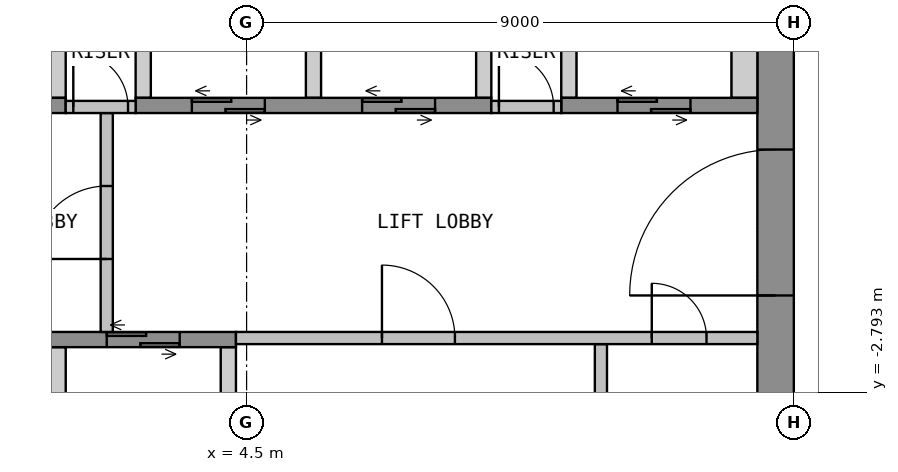
"""IFC4 building model, lengths in metres.
Left out: names, types, materials, properties, quantities, classifications, styles, units other than length and angle.
Written with IfcOpenShell. Run it as: python <this file> out.ifc"""

import sys

from ifc_helpers import new_model, si_unit, direction, frame, frame_2d, origin, place, context, subcontext, project, spatial, polyline, rectangle, outline, extrude, element, fill, save


model = new_model("IFC4")
c1 = context("Model", 3, precision=1e-05, world=origin(), true_north=direction((0.0, 1.0)))
c2 = subcontext(c1, "Body", "Model", "MODEL_VIEW")
j1 = project(units=[si_unit("LENGTHUNIT", "METRE"), si_unit("PLANEANGLEUNIT", "RADIAN")], contexts=[c1])
p1 = place(None, origin())
s1 = spatial("IfcSite", under=j1, at=p1, CompositionType="ELEMENT")
p2 = place(p1, origin())
s2 = spatial("IfcBuilding", under=s1, at=p2, CompositionType="ELEMENT")
p3 = place(p2, frame((0.0, 0.0, 246.9)))
s3 = spatial("IfcBuildingStorey", under=s2, at=p3, CompositionType="ELEMENT", Elevation=246.9)
p4 = place(p3, frame((13.2, -10.65, 0.0), z_axis=(0.0, 0.0, 1.0), x_axis=(0.0, 1.0, 0.0)))
e1 = element("IfcWall", 1, at=p4, inside=s3, PredefinedType="SHEAR", context=c2, shape_type="SweptSolid", body=[
    extrude(rectangle(XDim=21.3, YDim=0.6, at=frame_2d((10.65, 0.0))), origin(), (0.0, 0.0, 1.0), 3.575),
])
p5 = place(p4, frame((9.45, 0.0, 0.0)))
e2 = element("IfcOpeningElement", 2, at=p5, cuts=e1, PredefinedType="OPENING", context=c2, shape_type="SweptSolid", body=[
    extrude(rectangle(XDim=2.4, YDim=2.1, at=frame_2d((1.2, 1.05))), frame((0.0, 0.31, 0.0), z_axis=(0.0, -1.0, 0.0), x_axis=(1.0, 0.0, 0.0)), (0.0, 0.0, 1.0), 0.62),
])
p6 = place(p3, origin())
e3 = element("IfcWall", 3, at=p6, inside=s3, PredefinedType="SHEAR", context=c2, shape_type="SweptSolid", body=[
    extrude(outline(polyline([(1.275, 2.05), (1.525, 2.05), (1.525, 4.75), (1.275, 4.75), (1.275, 2.05)])), origin(), (0.0, 0.0, 1.0), 3.575),
])
p7 = place(p3, origin())
e4 = element("IfcWall", 4, at=p7, inside=s3, PredefinedType="SHEAR", context=c2, shape_type="SweptSolid", body=[
    extrude(outline(polyline([(2.675, 2.05), (2.925, 2.05), (2.925, 4.75), (2.675, 4.75), (2.675, 2.05)])), origin(), (0.0, 0.0, 1.0), 3.575),
])
p8 = place(p3, origin())
e5 = element("IfcWall", 5, at=p8, inside=s3, PredefinedType="SHEAR", context=c2, shape_type="SweptSolid", body=[
    extrude(outline(polyline([(5.475, 2.05), (5.725, 2.05), (5.725, 4.75), (5.475, 4.75), (5.475, 2.05)])), origin(), (0.0, 0.0, 1.0), 3.575),
])
p9 = place(p3, origin())
e6 = element("IfcWall", 6, at=p9, inside=s3, PredefinedType="SHEAR", context=c2, shape_type="SweptSolid", body=[
    extrude(outline(polyline([(8.275, 2.05), (8.525, 2.05), (8.525, 4.75), (8.275, 4.75), (8.275, 2.05)])), origin(), (0.0, 0.0, 1.0), 3.575),
])
p10 = place(p3, origin())
e7 = element("IfcWall", 7, at=p10, inside=s3, PredefinedType="SHEAR", context=c2, shape_type="SweptSolid", body=[
    extrude(outline(polyline([(9.675, 2.05), (9.925, 2.05), (9.925, 4.75), (9.675, 4.75), (9.675, 2.05)])), origin(), (0.0, 0.0, 1.0), 3.575),
])
p11 = place(p3, origin())
e8 = element("IfcWall", 8, at=p11, inside=s3, PredefinedType="SHEAR", context=c2, shape_type="SweptSolid", body=[
    extrude(outline(polyline([(12.475, 2.05), (12.9, 2.05), (12.9, 4.75), (12.475, 4.75), (12.475, 2.05)])), origin(), (0.0, 0.0, 1.0), 3.575),
])
p12 = place(p3, frame((-1.525, 1.925, 0.0), z_axis=(0.0, 0.0, 1.0), x_axis=(1.0, 0.0, 0.0)))
e9 = element("IfcWall", 9, at=p12, inside=s3, PredefinedType="SHEAR", context=c2, shape_type="SweptSolid", body=[
    extrude(rectangle(XDim=3.05, YDim=0.25, at=frame_2d((1.525, 0.0))), origin(), (0.0, 0.0, 1.0), 3.575),
])
p13 = place(p12, frame((0.925, 0.0, 0.0)))
e10 = element("IfcOpeningElement", 10, at=p13, cuts=e9, PredefinedType="OPENING", context=c2, shape_type="SweptSolid", body=[
    extrude(rectangle(XDim=1.2, YDim=2.1, at=frame_2d((0.6, 1.05))), frame((0.0, 0.135, 0.0), z_axis=(0.0, -1.0, 0.0), x_axis=(1.0, 0.0, 0.0)), (0.0, 0.0, 1.0), 0.27),
])
p14 = place(p3, frame((2.675, 1.925, 0.0), z_axis=(0.0, 0.0, 1.0), x_axis=(1.0, 0.0, 0.0)))
e11 = element("IfcWall", 11, at=p14, inside=s3, PredefinedType="SHEAR", context=c2, shape_type="SweptSolid", body=[
    extrude(rectangle(XDim=5.85, YDim=0.25, at=frame_2d((2.925, 0.0))), origin(), (0.0, 0.0, 1.0), 3.575),
])
p15 = place(p14, frame((0.925, 0.0, 0.0)))
e12 = element("IfcOpeningElement", 12, at=p15, cuts=e11, PredefinedType="OPENING", context=c2, shape_type="SweptSolid", body=[
    extrude(rectangle(XDim=1.2, YDim=2.1, at=frame_2d((0.6, 1.05))), frame((0.0, 0.135, 0.0), z_axis=(0.0, -1.0, 0.0), x_axis=(1.0, 0.0, 0.0)), (0.0, 0.0, 1.0), 0.27),
])
p16 = place(p14, frame((3.725, 0.0, 0.0)))
e13 = element("IfcOpeningElement", 13, at=p16, cuts=e11, PredefinedType="OPENING", context=c2, shape_type="SweptSolid", body=[
    extrude(rectangle(XDim=1.2, YDim=2.1, at=frame_2d((0.6, 1.05))), frame((0.0, 0.135, 0.0), z_axis=(0.0, -1.0, 0.0), x_axis=(1.0, 0.0, 0.0)), (0.0, 0.0, 1.0), 0.27),
])
p17 = place(p3, frame((9.675, 1.925, 0.0), z_axis=(0.0, 0.0, 1.0), x_axis=(1.0, 0.0, 0.0)))
e14 = element("IfcWall", 14, at=p17, inside=s3, PredefinedType="SHEAR", context=c2, shape_type="SweptSolid", body=[
    extrude(rectangle(XDim=3.225, YDim=0.25, at=frame_2d((1.612, 0.0))), origin(), (0.0, 0.0, 1.0), 3.575),
])
p18 = place(p17, frame((0.925, 0.0, 0.0)))
e15 = element("IfcOpeningElement", 15, at=p18, cuts=e14, PredefinedType="OPENING", context=c2, shape_type="SweptSolid", body=[
    extrude(rectangle(XDim=1.2, YDim=2.1, at=frame_2d((0.6, 1.05))), frame((0.0, 0.135, 0.0), z_axis=(0.0, -1.0, 0.0), x_axis=(1.0, 0.0, 0.0)), (0.0, 0.0, 1.0), 0.27),
])
p19 = place(p3, origin())
e16 = element("IfcWall", 16, at=p19, inside=s3, PredefinedType="SHEAR", context=c2, shape_type="SweptSolid", body=[
    extrude(outline(polyline([(1.275, -4.75), (1.525, -4.75), (1.525, -2.05), (1.275, -2.05), (1.275, -4.75)])), origin(), (0.0, 0.0, 1.0), 3.575),
])
p20 = place(p3, origin())
e17 = element("IfcWall", 17, at=p20, inside=s3, PredefinedType="SHEAR", context=c2, shape_type="SweptSolid", body=[
    extrude(outline(polyline([(4.075, -4.75), (4.325, -4.75), (4.325, -2.05), (4.075, -2.05), (4.075, -4.75)])), origin(), (0.0, 0.0, 1.0), 3.575),
])
p21 = place(p3, frame((-1.525, -1.925, 0.0), z_axis=(0.0, 0.0, 1.0), x_axis=(1.0, 0.0, 0.0)))
e18 = element("IfcWall", 18, at=p21, inside=s3, PredefinedType="SHEAR", context=c2, shape_type="SweptSolid", body=[
    extrude(rectangle(XDim=5.85, YDim=0.25, at=frame_2d((2.925, 0.0))), origin(), (0.0, 0.0, 1.0), 3.575),
])
p22 = place(p21, frame((0.925, 0.0, 0.0)))
e19 = element("IfcOpeningElement", 19, at=p22, cuts=e18, PredefinedType="OPENING", context=c2, shape_type="SweptSolid", body=[
    extrude(rectangle(XDim=1.2, YDim=2.1, at=frame_2d((0.6, 1.05))), frame((0.0, 0.135, 0.0), z_axis=(0.0, -1.0, 0.0), x_axis=(1.0, 0.0, 0.0)), (0.0, 0.0, 1.0), 0.27),
])
p23 = place(p21, frame((3.725, 0.0, 0.0)))
e20 = element("IfcOpeningElement", 20, at=p23, cuts=e18, PredefinedType="OPENING", context=c2, shape_type="SweptSolid", body=[
    extrude(rectangle(XDim=1.2, YDim=2.1, at=frame_2d((0.6, 1.05))), frame((0.0, 0.135, 0.0), z_axis=(0.0, -1.0, 0.0), x_axis=(1.0, 0.0, 0.0)), (0.0, 0.0, 1.0), 0.27),
])
p24 = place(p3, frame((2.2, -1.8, 0.0), z_axis=(0.0, 0.0, 1.0), x_axis=(0.0, 1.0, 0.0)))
e21 = element("IfcWall", 21, at=p24, inside=s3, PredefinedType="PARTITIONING", context=c2, shape_type="SweptSolid", body=[
    extrude(rectangle(XDim=3.6, YDim=0.2, at=frame_2d((1.8, 0.0))), origin(), (0.0, 0.0, 1.0), 3.575),
])
p25 = place(p24, frame((1.2, 0.0, 0.0)))
e22 = element("IfcOpeningElement", 22, at=p25, cuts=e21, PredefinedType="OPENING", context=c2, shape_type="SweptSolid", body=[
    extrude(rectangle(XDim=1.2, YDim=2.1, at=frame_2d((0.6, 1.05))), frame((0.0, 0.11, 0.0), z_axis=(0.0, -1.0, 0.0), x_axis=(1.0, 0.0, 0.0)), (0.0, 0.0, 1.0), 0.22),
])
p26 = place(p3, frame((1.525, 1.9, 0.0), z_axis=(0.0, 0.0, 1.0), x_axis=(1.0, 0.0, 0.0)))
e23 = element("IfcWall", 23, at=p26, inside=s3, PredefinedType="PARTITIONING", context=c2, shape_type="SweptSolid", body=[
    extrude(rectangle(XDim=1.15, YDim=0.2, at=frame_2d((0.575, 0.0))), origin(), (0.0, 0.0, 1.0), 3.575),
])
p27 = place(p26, frame((0.125, 0.0, 0.0)))
e24 = element("IfcOpeningElement", 24, at=p27, cuts=e23, PredefinedType="OPENING", context=c2, shape_type="SweptSolid", body=[
    extrude(rectangle(XDim=0.9, YDim=2.1, at=frame_2d((0.45, 1.05))), frame((0.0, 0.11, 0.0), z_axis=(0.0, -1.0, 0.0), x_axis=(1.0, 0.0, 0.0)), (0.0, 0.0, 1.0), 0.22),
])
p28 = place(p3, frame((8.525, 1.9, 0.0), z_axis=(0.0, 0.0, 1.0), x_axis=(1.0, 0.0, 0.0)))
e25 = element("IfcWall", 25, at=p28, inside=s3, PredefinedType="PARTITIONING", context=c2, shape_type="SweptSolid", body=[
    extrude(rectangle(XDim=1.15, YDim=0.2, at=frame_2d((0.575, 0.0))), origin(), (0.0, 0.0, 1.0), 3.575),
])
p29 = place(p28, frame((0.125, 0.0, 0.0)))
e26 = element("IfcOpeningElement", 26, at=p29, cuts=e25, PredefinedType="OPENING", context=c2, shape_type="SweptSolid", body=[
    extrude(rectangle(XDim=0.9, YDim=2.1, at=frame_2d((0.45, 1.05))), frame((0.0, 0.11, 0.0), z_axis=(0.0, -1.0, 0.0), x_axis=(1.0, 0.0, 0.0)), (0.0, 0.0, 1.0), 0.22),
])
p30 = place(p3, frame((10.327, -4.8, 0.0), z_axis=(0.0, 0.0, 1.0), x_axis=(0.0, 1.0, 0.0)))
e27 = element("IfcWall", 27, at=p30, inside=s3, PredefinedType="PARTITIONING", context=c2, shape_type="SweptSolid", body=[
    extrude(rectangle(XDim=2.8, YDim=0.2, at=frame_2d((1.4, 0.0))), origin(), (0.0, 0.0, 1.0), 3.575),
])
p31 = place(p3, frame((4.325, -1.9, 0.0), z_axis=(0.0, 0.0, 1.0), x_axis=(1.0, 0.0, 0.0)))
e28 = element("IfcWall", 28, at=p31, inside=s3, PredefinedType="PARTITIONING", context=c2, shape_type="SweptSolid", body=[
    extrude(rectangle(XDim=8.575, YDim=0.2, at=frame_2d((4.288, 0.0))), origin(), (0.0, 0.0, 1.0), 3.575),
])
p32 = place(p31, frame((2.401, 0.0, 0.0)))
e29 = element("IfcOpeningElement", 29, at=p32, cuts=e28, PredefinedType="OPENING", context=c2, shape_type="SweptSolid", body=[
    extrude(rectangle(XDim=1.2, YDim=2.1, at=frame_2d((0.6, 1.05))), frame((0.0, 0.11, 0.0), z_axis=(0.0, -1.0, 0.0), x_axis=(1.0, 0.0, 0.0)), (0.0, 0.0, 1.0), 0.22),
])
p33 = place(p31, frame((6.839, 0.0, 0.0)))
e30 = element("IfcOpeningElement", 30, at=p33, cuts=e28, PredefinedType="OPENING", context=c2, shape_type="SweptSolid", body=[
    extrude(rectangle(XDim=0.9, YDim=2.1, at=frame_2d((0.45, 1.05))), frame((0.0, 0.11, 0.0), z_axis=(0.0, -1.0, 0.0), x_axis=(1.0, 0.0, 0.0)), (0.0, 0.0, 1.0), 0.22),
])
p34 = place(p5, origin())
e31 = element("IfcDoor", 31, at=p34, inside=s3, OperationType="DOUBLE_DOOR_DOUBLE_SWING", PredefinedType="DOOR", context=c2, shape_type="SweptSolid", body=[
    extrude(rectangle(XDim=2.4, YDim=2.1, at=frame_2d((1.2, 1.05))), frame((0.0, 0.025, 0.0), z_axis=(0.0, -1.0, 0.0), x_axis=(1.0, 0.0, 0.0)), (0.0, 0.0, 1.0), 0.05),
])
fill(e2, e31)
p35 = place(p15, origin())
e32 = element("IfcDoor", 32, at=p35, inside=s3, OperationType="DOUBLE_DOOR_SLIDING", PredefinedType="DOOR", context=c2, shape_type="SweptSolid", body=[
    extrude(rectangle(XDim=1.2, YDim=2.1, at=frame_2d((0.6, 1.05))), frame((0.0, 0.025, 0.0), z_axis=(0.0, -1.0, 0.0), x_axis=(1.0, 0.0, 0.0)), (0.0, 0.0, 1.0), 0.05),
])
fill(e12, e32)
p36 = place(p16, origin())
e33 = element("IfcDoor", 33, at=p36, inside=s3, OperationType="DOUBLE_DOOR_SLIDING", PredefinedType="DOOR", context=c2, shape_type="SweptSolid", body=[
    extrude(rectangle(XDim=1.2, YDim=2.1, at=frame_2d((0.6, 1.05))), frame((0.0, 0.025, 0.0), z_axis=(0.0, -1.0, 0.0), x_axis=(1.0, 0.0, 0.0)), (0.0, 0.0, 1.0), 0.05),
])
fill(e13, e33)
p37 = place(p18, origin())
e34 = element("IfcDoor", 34, at=p37, inside=s3, OperationType="DOUBLE_DOOR_SLIDING", PredefinedType="DOOR", context=c2, shape_type="SweptSolid", body=[
    extrude(rectangle(XDim=1.2, YDim=2.1, at=frame_2d((0.6, 1.05))), frame((0.0, 0.025, 0.0), z_axis=(0.0, -1.0, 0.0), x_axis=(1.0, 0.0, 0.0)), (0.0, 0.0, 1.0), 0.05),
])
fill(e15, e34)
p38 = place(p23, origin())
e35 = element("IfcDoor", 35, at=p38, inside=s3, OperationType="DOUBLE_DOOR_SLIDING", PredefinedType="DOOR", context=c2, shape_type="SweptSolid", body=[
    extrude(rectangle(XDim=1.2, YDim=2.1, at=frame_2d((0.6, 1.05))), frame((0.0, 0.025, 0.0), z_axis=(0.0, -1.0, 0.0), x_axis=(1.0, 0.0, 0.0)), (0.0, 0.0, 1.0), 0.05),
])
fill(e20, e35)
p39 = place(p25, origin())
e36 = element("IfcDoor", 36, at=p39, inside=s3, OperationType="SINGLE_SWING_LEFT", PredefinedType="DOOR", context=c2, shape_type="SweptSolid", body=[
    extrude(rectangle(XDim=1.2, YDim=2.1, at=frame_2d((0.6, 1.05))), frame((0.0, 0.025, 0.0), z_axis=(0.0, -1.0, 0.0), x_axis=(1.0, 0.0, 0.0)), (0.0, 0.0, 1.0), 0.05),
])
fill(e22, e36)
p40 = place(p27, origin())
e37 = element("IfcDoor", 37, at=p40, inside=s3, OperationType="SINGLE_SWING_LEFT", PredefinedType="DOOR", context=c2, shape_type="SweptSolid", body=[
    extrude(rectangle(XDim=0.9, YDim=2.1, at=frame_2d((0.45, 1.05))), frame((0.0, 0.025, 0.0), z_axis=(0.0, -1.0, 0.0), x_axis=(1.0, 0.0, 0.0)), (0.0, 0.0, 1.0), 0.05),
])
fill(e24, e37)
p41 = place(p29, origin())
e38 = element("IfcDoor", 38, at=p41, inside=s3, OperationType="SINGLE_SWING_LEFT", PredefinedType="DOOR", context=c2, shape_type="SweptSolid", body=[
    extrude(rectangle(XDim=0.9, YDim=2.1, at=frame_2d((0.45, 1.05))), frame((0.0, 0.025, 0.0), z_axis=(0.0, -1.0, 0.0), x_axis=(1.0, 0.0, 0.0)), (0.0, 0.0, 1.0), 0.05),
])
fill(e26, e38)
p42 = place(p32, origin())
e39 = element("IfcDoor", 39, at=p42, inside=s3, OperationType="SINGLE_SWING_RIGHT", PredefinedType="DOOR", context=c2, shape_type="SweptSolid", body=[
    extrude(rectangle(XDim=1.2, YDim=2.1, at=frame_2d((0.6, 1.05))), frame((0.0, 0.025, 0.0), z_axis=(0.0, -1.0, 0.0), x_axis=(1.0, 0.0, 0.0)), (0.0, 0.0, 1.0), 0.05),
])
fill(e29, e39)
p43 = place(p33, origin())
e40 = element("IfcDoor", 40, at=p43, inside=s3, OperationType="SINGLE_SWING_LEFT", PredefinedType="DOOR", context=c2, shape_type="SweptSolid", body=[
    extrude(rectangle(XDim=0.9, YDim=2.1, at=frame_2d((0.45, 1.05))), frame((0.0, 0.025, 0.0), z_axis=(0.0, -1.0, 0.0), x_axis=(1.0, 0.0, 0.0)), (0.0, 0.0, 1.0), 0.05),
])
fill(e30, e40)
save(model, sys.argv[1])
